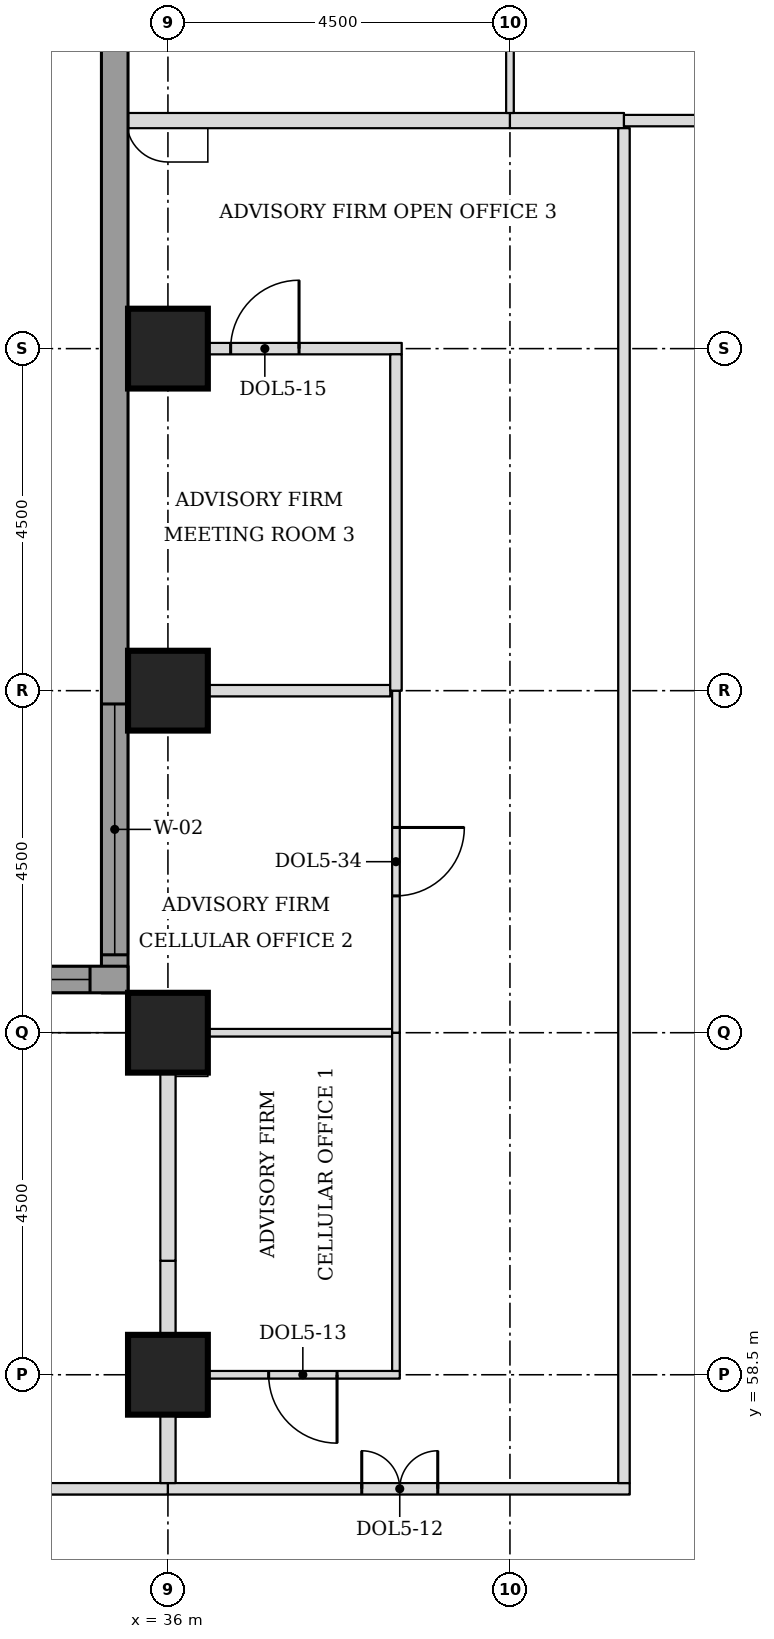
"""IFC4 building model, lengths in metres.
Left out: names, types, materials, properties, quantities, classifications, styles, units other than length and angle.
Written with IfcOpenShell. Run it as: python <this file> out.ifc"""

import sys

from ifc_helpers import new_model, si_unit, direction, frame, frame_2d, origin, origin_2d, place, context, subcontext, project, spatial, rectangle, extrude, element, fill, save


model = new_model("IFC4")
c1 = context("Model", 3, precision=1e-05, world=origin(), true_north=direction((0.0, 1.0)))
c2 = subcontext(c1, "Body", "Model", "MODEL_VIEW")
j1 = project(units=[si_unit("LENGTHUNIT", "METRE"), si_unit("PLANEANGLEUNIT", "RADIAN")], contexts=[c1])
p1 = place(None, origin())
s1 = spatial("IfcSite", under=j1, at=p1, CompositionType="ELEMENT")
p2 = place(p1, origin())
s2 = spatial("IfcBuilding", under=s1, at=p2, CompositionType="ELEMENT")
p3 = place(p2, frame((0.0, 0.0, 112.2)))
s3 = spatial("IfcBuildingStorey", under=s2, at=p3, CompositionType="ELEMENT", Elevation=112.2)
for number, where, z_axis, x_axis in (
    (1, (36.0, 58.5, 0.0), (0.0, 0.0, 1.0), (1.0, 0.0, 0.0)),
    (2, (36.0, 63.0, 0.0), (0.0, 0.0, 1.0), (1.0, 0.0, 0.0)),
    (3, (36.0, 67.5, 0.0), (0.0, 0.0, 1.0), (1.0, 0.0, 0.0)),
    (4, (36.0, 72.0, 0.0), (0.0, 0.0, 1.0), (1.0, 0.0, 0.0)),
):
    element("IfcColumn", number, at=place(p3, frame(where, z_axis=z_axis, x_axis=x_axis)), inside=s3, PredefinedType="COLUMN", context=c2, shape_type="SweptSolid", body=[
        extrude(rectangle(XDim=1.05, YDim=1.05, at=origin_2d()), origin(), (0.0, 0.0, 1.0), 3.7),
    ])
p4 = place(p3, frame((35.3, 76.862, 0.0), z_axis=(0.0, 0.0, 1.0), x_axis=(0.0, -1.0, 0.0)))
e5 = element("IfcWall", 5, at=p4, inside=s3, PredefinedType="STANDARD", context=c2, shape_type="SweptSolid", body=[
    extrude(rectangle(XDim=13.337, YDim=0.35, at=frame_2d((6.669, 0.0))), origin(), (0.0, 0.0, 1.0), 3.525),
])
p5 = place(p4, frame((9.537, 0.0, 0.9)))
e6 = element("IfcOpeningElement", 6, at=p5, cuts=e5, PredefinedType="OPENING", context=c2, shape_type="SweptSolid", body=[
    extrude(rectangle(XDim=3.3, YDim=1.9, at=frame_2d((1.65, 0.95))), frame((0.0, 0.185, 0.0), z_axis=(0.0, -1.0, 0.0), x_axis=(1.0, 0.0, 0.0)), (0.0, 0.0, 1.0), 0.37),
])
p6 = place(p3, frame((35.475, 63.7, 0.0), z_axis=(0.0, 0.0, 1.0), x_axis=(-1.0, 0.0, 0.0)))
e7 = element("IfcWall", 7, at=p6, inside=s3, PredefinedType="STANDARD", context=c2, shape_type="SweptSolid", body=[
    extrude(rectangle(XDim=17.837, YDim=0.35, at=frame_2d((8.919, 0.0))), origin(), (0.0, 0.0, 1.0), 3.525),
])
p7 = place(p6, frame((0.5, 0.0, 0.9)))
e8 = element("IfcOpeningElement", 8, at=p7, cuts=e7, PredefinedType="OPENING", context=c2, shape_type="SweptSolid", body=[
    extrude(rectangle(XDim=3.3, YDim=1.9, at=frame_2d((1.65, 0.95))), frame((0.0, 0.185, 0.0), z_axis=(0.0, -1.0, 0.0), x_axis=(1.0, 0.0, 0.0)), (0.0, 0.0, 1.0), 0.37),
])
p8 = place(p6, frame((9.075, 0.0, 0.9)))
e9 = element("IfcOpeningElement", 9, at=p8, cuts=e7, PredefinedType="OPENING", context=c2, shape_type="SweptSolid", body=[
    extrude(rectangle(XDim=3.3, YDim=1.9, at=frame_2d((1.65, 0.95))), frame((0.0, 0.185, 0.0), z_axis=(0.0, -1.0, 0.0), x_axis=(1.0, 0.0, 0.0)), (0.0, 0.0, 1.0), 0.37),
])
p9 = place(p3, frame((29.38, 57.0, 0.0), z_axis=(0.0, 0.0, 1.0), x_axis=(1.0, 0.0, 0.0)))
e10 = element("IfcWall", 10, at=p9, inside=s3, PredefinedType="PARTITIONING", context=c2, shape_type="SweptSolid", body=[
    extrude(rectangle(XDim=6.62, YDim=0.15, at=frame_2d((3.31, 0.0))), origin(), (0.0, 0.0, 1.0), 3.55),
])
p10 = place(p9, frame((2.88, 0.0, 0.0)))
e11 = element("IfcOpeningElement", 11, at=p10, cuts=e10, PredefinedType="OPENING", context=c2, shape_type="SweptSolid", body=[
    extrude(rectangle(XDim=1.0, YDim=2.1, at=frame_2d((0.5, 1.05))), frame((0.0, 0.085, 0.0), z_axis=(0.0, -1.0, 0.0), x_axis=(1.0, 0.0, 0.0)), (0.0, 0.0, 1.0), 0.17),
])
p11 = place(p3, frame((36.0, 57.0, 0.0), z_axis=(0.0, 0.0, 1.0), x_axis=(1.0, 0.0, 0.0)))
e12 = element("IfcWall", 12, at=p11, inside=s3, PredefinedType="PARTITIONING", context=c2, shape_type="SweptSolid", body=[
    extrude(rectangle(XDim=6.075, YDim=0.15, at=frame_2d((3.038, 0.0))), origin(), (0.0, 0.0, 1.0), 3.55),
])
p12 = place(p11, frame((2.55, 0.0, 0.0)))
e13 = element("IfcOpeningElement", 13, at=p12, cuts=e12, PredefinedType="OPENING", context=c2, shape_type="SweptSolid", body=[
    extrude(rectangle(XDim=1.0, YDim=2.1, at=frame_2d((0.5, 1.05))), frame((0.0, 0.085, 0.0), z_axis=(0.0, -1.0, 0.0), x_axis=(1.0, 0.0, 0.0)), (0.0, 0.0, 1.0), 0.17),
])
p13 = place(p3, frame((36.525, 58.5, 0.0), z_axis=(0.0, 0.0, 1.0), x_axis=(1.0, 0.0, 0.0)))
e14 = element("IfcWall", 14, at=p13, inside=s3, PredefinedType="PARTITIONING", context=c2, shape_type="SweptSolid", body=[
    extrude(rectangle(XDim=2.525, YDim=0.1, at=frame_2d((1.263, 0.0))), origin(), (0.0, 0.0, 1.0), 3.55),
])
p14 = place(p13, frame((0.8, 0.0, 0.0)))
e15 = element("IfcOpeningElement", 15, at=p14, cuts=e14, PredefinedType="OPENING", context=c2, shape_type="SweptSolid", body=[
    extrude(rectangle(XDim=0.9, YDim=2.1, at=frame_2d((0.45, 1.05))), frame((0.0, 0.06, 0.0), z_axis=(0.0, -1.0, 0.0), x_axis=(1.0, 0.0, 0.0)), (0.0, 0.0, 1.0), 0.12),
])
p15 = place(p3, frame((36.525, 63.0, 0.0), z_axis=(0.0, 0.0, 1.0), x_axis=(1.0, 0.0, 0.0)))
e16 = element("IfcWall", 16, at=p15, inside=s3, PredefinedType="PARTITIONING", context=c2, shape_type="SweptSolid", body=[
    extrude(rectangle(XDim=2.425, YDim=0.1, at=frame_2d((1.212, 0.0))), origin(), (0.0, 0.0, 1.0), 3.55),
])
p16 = place(p3, frame((35.475, 67.5, 0.0), z_axis=(0.0, 0.0, 1.0), x_axis=(1.0, 0.0, 0.0)))
e17 = element("IfcWall", 17, at=p16, inside=s3, PredefinedType="PARTITIONING", context=c2, shape_type="SweptSolid", body=[
    extrude(rectangle(XDim=3.45, YDim=0.15, at=frame_2d((1.725, 0.0))), origin(), (0.0, 0.0, 1.0), 3.55),
])
p17 = place(p3, frame((35.475, 72.0, 0.0), z_axis=(0.0, 0.0, 1.0), x_axis=(1.0, 0.0, 0.0)))
e18 = element("IfcWall", 18, at=p17, inside=s3, PredefinedType="PARTITIONING", context=c2, shape_type="SweptSolid", body=[
    extrude(rectangle(XDim=3.6, YDim=0.15, at=frame_2d((1.8, 0.0))), origin(), (0.0, 0.0, 1.0), 3.55),
])
p18 = place(p17, frame((1.35, 0.0, 0.0)))
e19 = element("IfcOpeningElement", 19, at=p18, cuts=e18, PredefinedType="OPENING", context=c2, shape_type="SweptSolid", body=[
    extrude(rectangle(XDim=0.9, YDim=2.1, at=frame_2d((0.45, 1.05))), frame((0.0, 0.085, 0.0), z_axis=(0.0, -1.0, 0.0), x_axis=(1.0, 0.0, 0.0)), (0.0, 0.0, 1.0), 0.17),
])
p19 = place(p3, frame((35.475, 75.0, 0.0), z_axis=(0.0, 0.0, 1.0), x_axis=(1.0, 0.0, 0.0)))
e20 = element("IfcWall", 20, at=p19, inside=s3, PredefinedType="PARTITIONING", context=c2, shape_type="SweptSolid", body=[
    extrude(rectangle(XDim=5.025, YDim=0.2, at=frame_2d((2.512, 0.0))), origin(), (0.0, 0.0, 1.0), 3.55),
])
p20 = place(p3, frame((40.5, 75.0, 0.0), z_axis=(0.0, 0.0, 1.0), x_axis=(1.0, 0.0, 0.0)))
e21 = element("IfcWall", 21, at=p20, inside=s3, PredefinedType="PARTITIONING", context=c2, shape_type="SweptSolid", body=[
    extrude(rectangle(XDim=1.5, YDim=0.2, at=frame_2d((0.75, 0.0))), origin(), (0.0, 0.0, 1.0), 3.55),
])
p21 = place(p3, frame((42.0, 75.0, 0.0), z_axis=(0.0, 0.0, 1.0), x_axis=(1.0, 0.0, 0.0)))
e22 = element("IfcWall", 22, at=p21, inside=s3, PredefinedType="PARTITIONING", context=c2, shape_type="SweptSolid", body=[
    extrude(rectangle(XDim=4.5, YDim=0.15, at=frame_2d((2.25, 0.0))), origin(), (0.0, 0.0, 1.0), 3.55),
])
p22 = place(p21, frame((1.75, 0.0, 0.0)))
e23 = element("IfcOpeningElement", 23, at=p22, cuts=e22, PredefinedType="OPENING", context=c2, shape_type="SweptSolid", body=[
    extrude(rectangle(XDim=1.0, YDim=2.1, at=frame_2d((0.5, 1.05))), frame((0.0, 0.085, 0.0), z_axis=(0.0, -1.0, 0.0), x_axis=(1.0, 0.0, 0.0)), (0.0, 0.0, 1.0), 0.17),
])
p23 = place(p3, frame((36.0, 57.075, 0.0), z_axis=(0.0, 0.0, 1.0), x_axis=(0.0, 1.0, 0.0)))
e24 = element("IfcWall", 24, at=p23, inside=s3, PredefinedType="PARTITIONING", context=c2, shape_type="SweptSolid", body=[
    extrude(rectangle(XDim=0.9, YDim=0.2, at=frame_2d((0.45, 0.0))), origin(), (0.0, 0.0, 1.0), 2.8),
])
p24 = place(p3, frame((42.0, 57.075, 0.0), z_axis=(0.0, 0.0, 1.0), x_axis=(0.0, 1.0, 0.0)))
e25 = element("IfcWall", 25, at=p24, inside=s3, PredefinedType="PARTITIONING", context=c2, shape_type="SweptSolid", body=[
    extrude(rectangle(XDim=17.825, YDim=0.15, at=frame_2d((8.913, 0.0))), origin(), (0.0, 0.0, 1.0), 3.55),
])
p25 = place(p3, frame((39.0, 58.55, 0.0), z_axis=(0.0, 0.0, 1.0), x_axis=(0.0, 1.0, 0.0)))
e26 = element("IfcWall", 26, at=p25, inside=s3, PredefinedType="PARTITIONING", context=c2, shape_type="SweptSolid", body=[
    extrude(rectangle(XDim=4.45, YDim=0.1, at=frame_2d((2.225, 0.0))), origin(), (0.0, 0.0, 1.0), 3.55),
])
p26 = place(p3, frame((36.0, 58.995, 0.0), z_axis=(0.0, 0.0, 1.0), x_axis=(0.0, 1.0, 0.0)))
e27 = element("IfcWall", 27, at=p26, inside=s3, PredefinedType="PARTITIONING", context=c2, shape_type="SweptSolid", body=[
    extrude(rectangle(XDim=1.005, YDim=0.2, at=frame_2d((0.502, 0.0))), origin(), (0.0, 0.0, 1.0), 2.8),
])
p27 = place(p3, frame((36.0, 60.0, 0.0), z_axis=(0.0, 0.0, 1.0), x_axis=(0.0, 1.0, 0.0)))
e28 = element("IfcWall", 28, at=p27, inside=s3, PredefinedType="PARTITIONING", context=c2, shape_type="SweptSolid", body=[
    extrude(rectangle(XDim=2.475, YDim=0.2, at=frame_2d((1.238, 0.0))), origin(), (0.0, 0.0, 1.0), 2.8),
])
p28 = place(p3, frame((39.0, 63.0, 0.0), z_axis=(0.0, 0.0, 1.0), x_axis=(0.0, 1.0, 0.0)))
e29 = element("IfcWall", 29, at=p28, inside=s3, PredefinedType="PARTITIONING", context=c2, shape_type="SweptSolid", body=[
    extrude(rectangle(XDim=4.5, YDim=0.1, at=frame_2d((2.25, 0.0))), origin(), (0.0, 0.0, 1.0), 3.55),
])
p29 = place(p28, frame((1.8, 0.0, 0.0)))
e30 = element("IfcOpeningElement", 30, at=p29, cuts=e29, PredefinedType="OPENING", context=c2, shape_type="SweptSolid", body=[
    extrude(rectangle(XDim=0.9, YDim=2.1, at=frame_2d((0.45, 1.05))), frame((0.0, 0.06, 0.0), z_axis=(0.0, -1.0, 0.0), x_axis=(1.0, 0.0, 0.0)), (0.0, 0.0, 1.0), 0.12),
])
p30 = place(p3, frame((39.0, 67.5, 0.0), z_axis=(0.0, 0.0, 1.0), x_axis=(0.0, 1.0, 0.0)))
e31 = element("IfcWall", 31, at=p30, inside=s3, PredefinedType="PARTITIONING", context=c2, shape_type="SweptSolid", body=[
    extrude(rectangle(XDim=4.425, YDim=0.15, at=frame_2d((2.212, 0.0))), origin(), (0.0, 0.0, 1.0), 3.55),
])
p31 = place(p3, frame((40.5, 75.1, 0.0), z_axis=(0.0, 0.0, 1.0), x_axis=(0.0, 1.0, 0.0)))
e32 = element("IfcWall", 32, at=p31, inside=s3, PredefinedType="PARTITIONING", context=c2, shape_type="SweptSolid", body=[
    extrude(rectangle(XDim=2.9, YDim=0.1, at=frame_2d((1.45, 0.0))), origin(), (0.0, 0.0, 1.0), 3.55),
])
p32 = place(p31, frame((1.0, 0.0, 0.0)))
e33 = element("IfcOpeningElement", 33, at=p32, cuts=e32, PredefinedType="OPENING", context=c2, shape_type="SweptSolid", body=[
    extrude(rectangle(XDim=0.9, YDim=2.1, at=frame_2d((0.45, 1.05))), frame((0.0, 0.06, 0.0), z_axis=(0.0, -1.0, 0.0), x_axis=(1.0, 0.0, 0.0)), (0.0, 0.0, 1.0), 0.12),
])
p33 = place(p5, origin())
e34 = element("IfcWindow", 34, at=p33, inside=s3, PartitioningType="SINGLE_PANEL", PredefinedType="WINDOW", context=c2, shape_type="SweptSolid", body=[
    extrude(rectangle(XDim=3.3, YDim=1.9, at=frame_2d((1.65, 0.95))), frame((0.0, 0.085, 0.0), z_axis=(0.0, -1.0, 0.0), x_axis=(1.0, 0.0, 0.0)), (0.0, 0.0, 1.0), 0.06),
])
fill(e6, e34)
p34 = place(p7, origin())
e35 = element("IfcWindow", 35, at=p34, inside=s3, PartitioningType="SINGLE_PANEL", PredefinedType="WINDOW", context=c2, shape_type="SweptSolid", body=[
    extrude(rectangle(XDim=3.3, YDim=1.9, at=frame_2d((1.65, 0.95))), frame((0.0, 0.085, 0.0), z_axis=(0.0, -1.0, 0.0), x_axis=(1.0, 0.0, 0.0)), (0.0, 0.0, 1.0), 0.06),
])
fill(e8, e35)
p35 = place(p12, origin())
e36 = element("IfcDoor", 36, at=p35, inside=s3, OperationType="DOUBLE_DOOR_SINGLE_SWING", PredefinedType="DOOR", context=c2, shape_type="SweptSolid", body=[
    extrude(rectangle(XDim=1.0, YDim=2.1, at=frame_2d((0.5, 1.05))), frame((0.0, 0.025, 0.0), z_axis=(0.0, -1.0, 0.0), x_axis=(1.0, 0.0, 0.0)), (0.0, 0.0, 1.0), 0.05),
])
fill(e13, e36)
p36 = place(p14, frame((0.9, 0.0, 0.0), z_axis=(0.0, 0.0, 1.0), x_axis=(-1.0, 0.0, 0.0)))
e37 = element("IfcDoor", 37, at=p36, inside=s3, OperationType="SINGLE_SWING_LEFT", PredefinedType="DOOR", context=c2, shape_type="SweptSolid", body=[
    extrude(rectangle(XDim=0.9, YDim=2.1, at=frame_2d((0.45, 1.05))), frame((0.0, 0.025, 0.0), z_axis=(0.0, -1.0, 0.0), x_axis=(1.0, 0.0, 0.0)), (0.0, 0.0, 1.0), 0.05),
])
fill(e15, e37)
p37 = place(p29, frame((0.9, 0.0, 0.0), z_axis=(0.0, 0.0, 1.0), x_axis=(-1.0, 0.0, 0.0)))
e38 = element("IfcDoor", 38, at=p37, inside=s3, OperationType="SINGLE_SWING_LEFT", PredefinedType="DOOR", context=c2, shape_type="SweptSolid", body=[
    extrude(rectangle(XDim=0.9, YDim=2.1, at=frame_2d((0.45, 1.05))), frame((0.0, 0.025, 0.0), z_axis=(0.0, -1.0, 0.0), x_axis=(1.0, 0.0, 0.0)), (0.0, 0.0, 1.0), 0.05),
])
fill(e30, e38)
p38 = place(p18, origin())
e39 = element("IfcDoor", 39, at=p38, inside=s3, OperationType="SINGLE_SWING_RIGHT", PredefinedType="DOOR", context=c2, shape_type="SweptSolid", body=[
    extrude(rectangle(XDim=0.9, YDim=2.1, at=frame_2d((0.45, 1.05))), frame((0.0, 0.025, 0.0), z_axis=(0.0, -1.0, 0.0), x_axis=(1.0, 0.0, 0.0)), (0.0, 0.0, 1.0), 0.05),
])
fill(e19, e39)
save(model, sys.argv[1])
